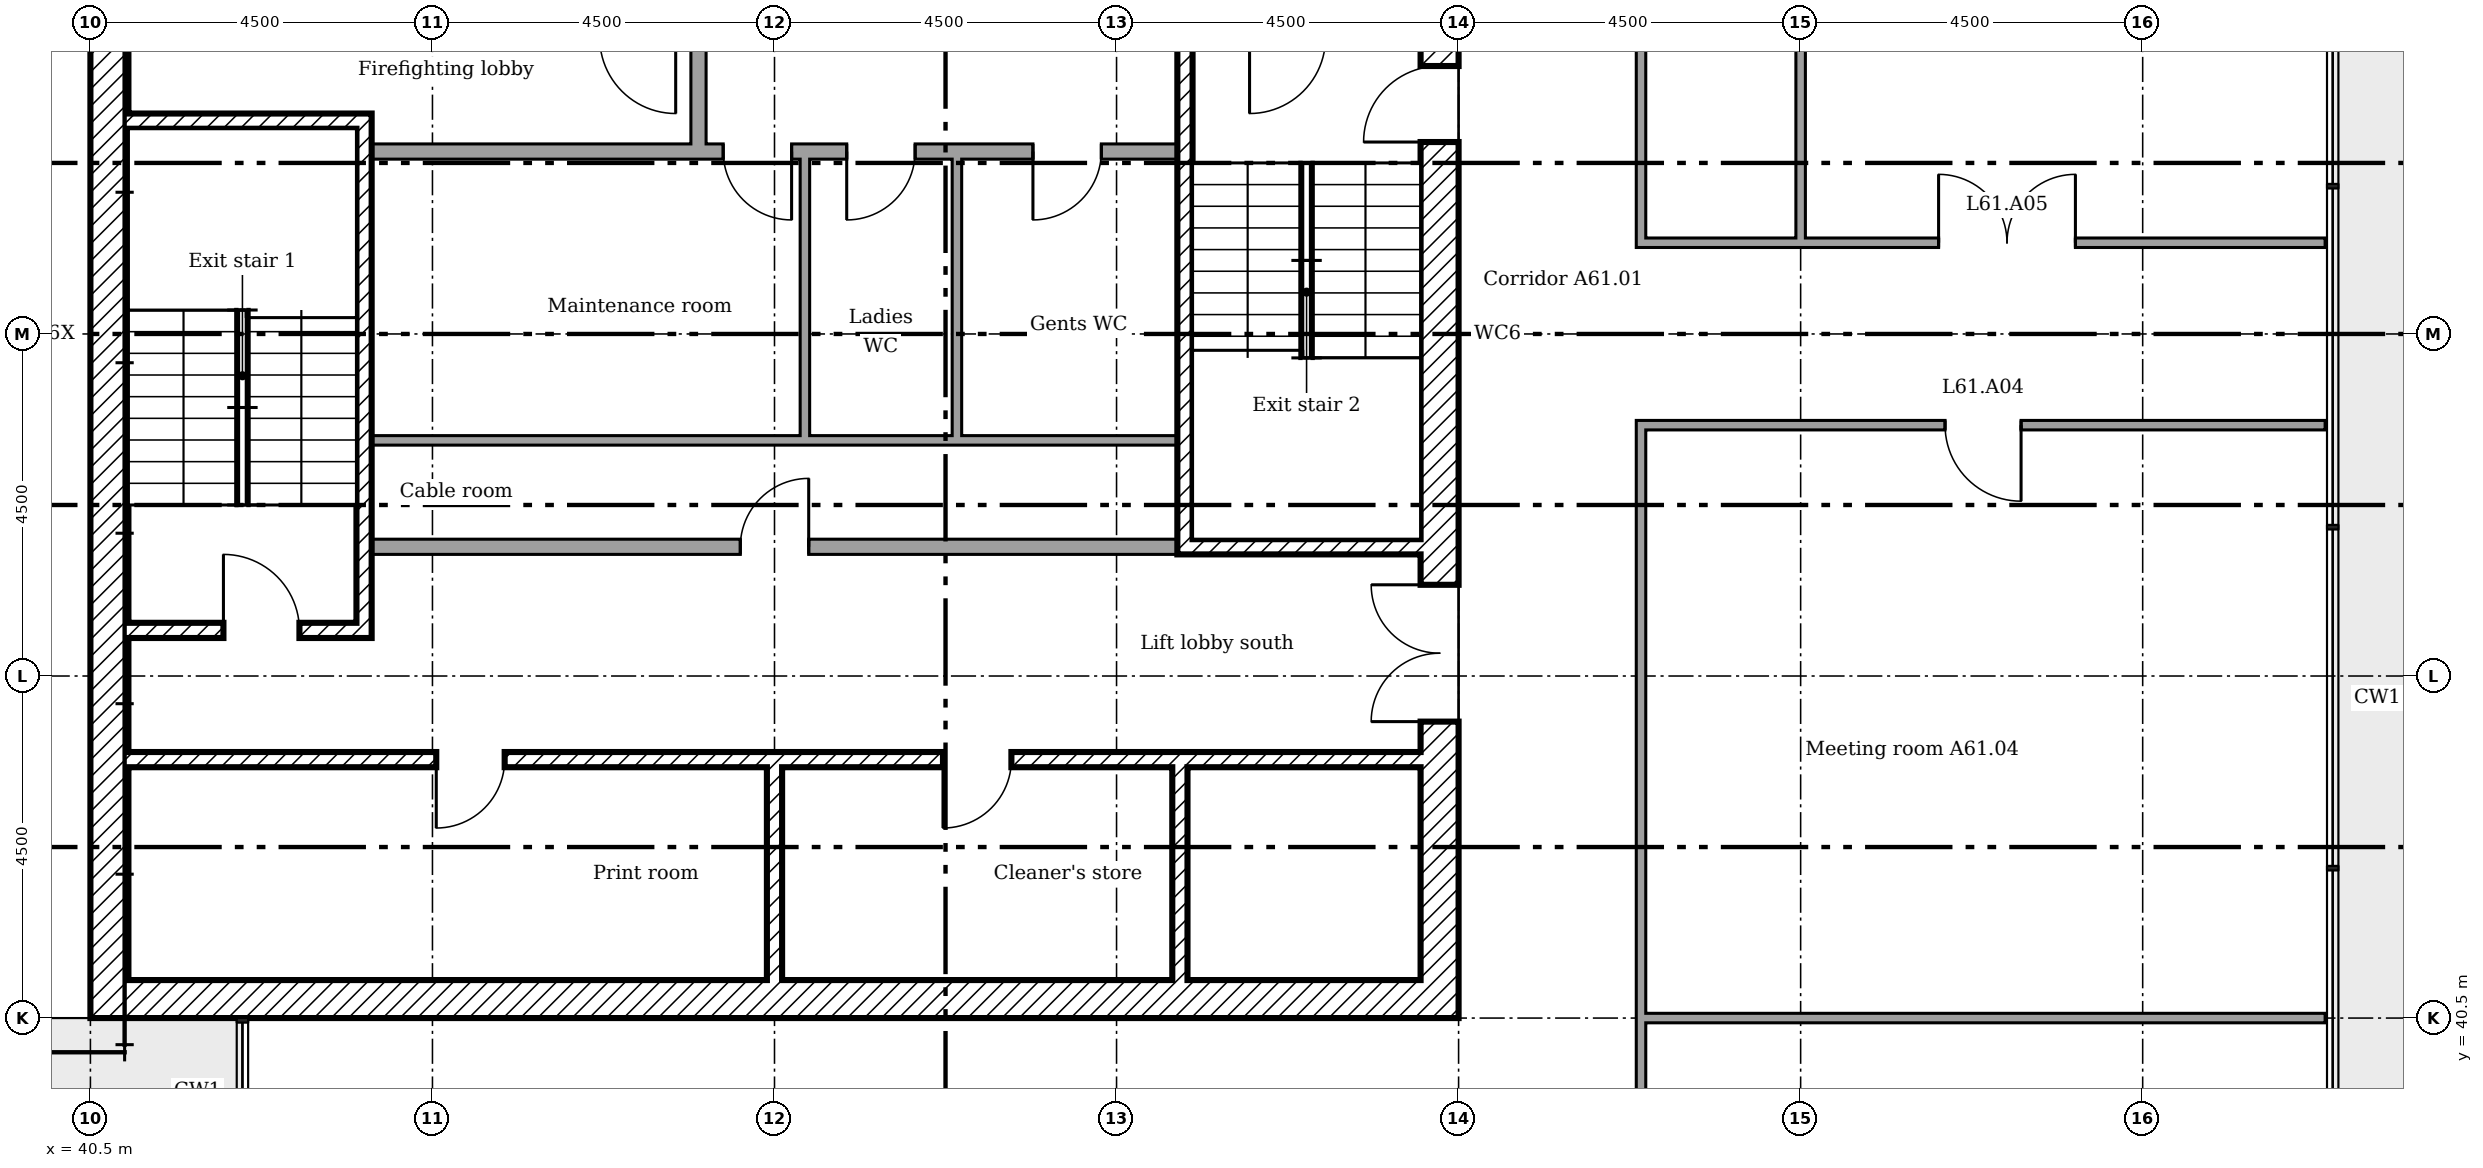
"""IFC4 building model, lengths in metres.
Left out: names, types, materials, properties, quantities, classifications, styles, units other than length and angle.
Written with IfcOpenShell. Run it as: python <this file> out.ifc"""

import sys

from ifc_helpers import new_model, si_unit, direction, frame, frame_2d, origin, place, context, subcontext, project, spatial, rectangle, extrude, element, fill, save


model = new_model("IFC4")
c1 = context("Model", 3, precision=1e-05, world=origin(), true_north=direction((0.0, 1.0)))
c2 = subcontext(c1, "Body", "Model", "MODEL_VIEW")
j1 = project(units=[si_unit("LENGTHUNIT", "METRE"), si_unit("PLANEANGLEUNIT", "RADIAN")], contexts=[c1])
p1 = place(None, origin())
s1 = spatial("IfcSite", under=j1, at=p1, CompositionType="ELEMENT")
p2 = place(p1, origin())
s2 = spatial("IfcBuilding", under=s1, at=p2, CompositionType="ELEMENT")
p3 = place(p2, frame((0.0, 0.0, 238.8)))
s3 = spatial("IfcBuildingStorey", under=s2, at=p3, CompositionType="ELEMENT", Elevation=238.8)
p4 = place(p3, frame((58.25, 40.5, 0.0), z_axis=(0.0, 0.0, 1.0), x_axis=(0.0, 1.0, 0.0)))
e1 = element("IfcWall", 1, at=p4, inside=s3, PredefinedType="SHEAR", context=c2, shape_type="SweptSolid", body=[
    extrude(rectangle(XDim=18.0, YDim=0.5, at=frame_2d((9.0, 0.0))), origin(), (0.0, 0.0, 1.0), 3.35),
])
p5 = place(p4, frame((13.15, 0.0, 0.0)))
e2 = element("IfcOpeningElement", 2, at=p5, cuts=e1, PredefinedType="OPENING", context=c2, shape_type="SweptSolid", body=[
    extrude(rectangle(XDim=1.2, YDim=2.1, at=frame_2d((0.6, 1.05))), frame((0.0, 0.26, 0.0), z_axis=(0.0, -1.0, 0.0), x_axis=(1.0, 0.0, 0.0)), (0.0, 0.0, 1.0), 0.52),
])
p6 = place(p4, frame((3.9, 0.0, 0.0)))
e3 = element("IfcOpeningElement", 3, at=p6, cuts=e1, PredefinedType="OPENING", context=c2, shape_type="SweptSolid", body=[
    extrude(rectangle(XDim=1.8, YDim=2.1, at=frame_2d((0.9, 1.05))), frame((0.0, 0.26, 0.0), z_axis=(0.0, -1.0, 0.0), x_axis=(1.0, 0.0, 0.0)), (0.0, 0.0, 1.0), 0.52),
])
p7 = place(p4, frame((11.525, 0.0, 0.0)))
e4 = element("IfcOpeningElement", 4, at=p7, cuts=e1, PredefinedType="OPENING", context=c2, shape_type="SweptSolid", body=[
    extrude(rectangle(XDim=1.0, YDim=2.1, at=frame_2d((0.5, 1.05))), frame((0.0, 0.26, 0.0), z_axis=(0.0, -1.0, 0.0), x_axis=(1.0, 0.0, 0.0)), (0.0, 0.0, 1.0), 0.52),
])
p8 = place(p3, frame((40.5, 40.75, 0.0)))
e5 = element("IfcWall", 5, at=p8, inside=s3, PredefinedType="SHEAR", context=c2, shape_type="SweptSolid", body=[
    extrude(rectangle(XDim=17.5, YDim=0.5, at=frame_2d((8.75, 0.0))), origin(), (0.0, 0.0, 1.0), 3.35),
])
p9 = place(p3, frame((40.75, 41.0, 0.0), z_axis=(0.0, 0.0, 1.0), x_axis=(0.0, 1.0, 0.0)))
e6 = element("IfcWall", 6, at=p9, inside=s3, PredefinedType="SHEAR", context=c2, shape_type="SweptSolid", body=[
    extrude(rectangle(XDim=17.0, YDim=0.5, at=frame_2d((8.5, 0.0))), origin(), (0.0, 0.0, 1.0), 3.35),
])
for number, where, z_axis, x_axis in (
    (7, (49.5, 41.0, 0.0), (0.0, 0.0, 1.0), (0.0, 1.0, 0.0)),
    (8, (54.833, 41.0, 0.0), (0.0, 0.0, 1.0), (0.0, 1.0, 0.0)),
):
    element("IfcWall", number, at=place(p3, frame(where, z_axis=z_axis, x_axis=x_axis)), inside=s3, PredefinedType="SHEAR", context=c2, shape_type="SweptSolid", body=[
        extrude(rectangle(XDim=2.8, YDim=0.2, at=frame_2d((1.4, 0.0))), origin(), (0.0, 0.0, 1.0), 3.35),
    ])
p10 = place(p3, frame((48.5, 51.9, 0.0), z_axis=(0.0, 0.0, 1.0), x_axis=(0.0, 1.0, 0.0)))
e9 = element("IfcWall", 9, at=p10, inside=s3, PredefinedType="PARTITIONING", context=c2, shape_type="SweptSolid", body=[
    extrude(rectangle(XDim=1.6, YDim=0.2, at=frame_2d((0.8, 0.0))), origin(), (0.0, 0.0, 1.0), 3.35),
])
p11 = place(p3, frame((41.0, 43.9, 0.0)))
e10 = element("IfcWall", 10, at=p11, inside=s3, PredefinedType="SHEAR", context=c2, shape_type="SweptSolid", body=[
    extrude(rectangle(XDim=17.0, YDim=0.2, at=frame_2d((8.5, 0.0))), origin(), (0.0, 0.0, 1.0), 3.35),
])
p12 = place(p11, frame((4.05, 0.0, 0.0)))
e11 = element("IfcOpeningElement", 11, at=p12, cuts=e10, PredefinedType="OPENING", context=c2, shape_type="SweptSolid", body=[
    extrude(rectangle(XDim=0.9, YDim=2.1, at=frame_2d((0.45, 1.05))), frame((0.0, 0.11, 0.0), z_axis=(0.0, -1.0, 0.0), x_axis=(1.0, 0.0, 0.0)), (0.0, 0.0, 1.0), 0.22),
])
p13 = place(p11, frame((10.717, 0.0, 0.0)))
e12 = element("IfcOpeningElement", 12, at=p13, cuts=e10, PredefinedType="OPENING", context=c2, shape_type="SweptSolid", body=[
    extrude(rectangle(XDim=0.9, YDim=2.1, at=frame_2d((0.45, 1.05))), frame((0.0, 0.11, 0.0), z_axis=(0.0, -1.0, 0.0), x_axis=(1.0, 0.0, 0.0)), (0.0, 0.0, 1.0), 0.22),
])
p14 = place(p3, frame((44.1, 45.5, 0.0), z_axis=(0.0, 0.0, 1.0), x_axis=(0.0, 1.0, 0.0)))
e13 = element("IfcWall", 13, at=p14, inside=s3, PredefinedType="SHEAR", context=c2, shape_type="SweptSolid", body=[
    extrude(rectangle(XDim=6.9, YDim=0.2, at=frame_2d((3.45, 0.0))), origin(), (0.0, 0.0, 1.0), 3.35),
])
p15 = place(p3, frame((41.0, 52.3, 0.0)))
e14 = element("IfcWall", 14, at=p15, inside=s3, PredefinedType="SHEAR", context=c2, shape_type="SweptSolid", body=[
    extrude(rectangle(XDim=3.0, YDim=0.2, at=frame_2d((1.5, 0.0))), origin(), (0.0, 0.0, 1.0), 3.35),
])
p16 = place(p3, frame((41.0, 45.6, 0.0)))
e15 = element("IfcWall", 15, at=p16, inside=s3, PredefinedType="SHEAR", context=c2, shape_type="SweptSolid", body=[
    extrude(rectangle(XDim=3.0, YDim=0.2, at=frame_2d((1.5, 0.0))), origin(), (0.0, 0.0, 1.0), 3.35),
])
p17 = place(p16, frame((1.25, 0.0, 0.0)))
e16 = element("IfcOpeningElement", 16, at=p17, cuts=e15, PredefinedType="OPENING", context=c2, shape_type="SweptSolid", body=[
    extrude(rectangle(XDim=1.0, YDim=2.1, at=frame_2d((0.5, 1.05))), frame((0.0, 0.11, 0.0), z_axis=(0.0, -1.0, 0.0), x_axis=(1.0, 0.0, 0.0)), (0.0, 0.0, 1.0), 0.22),
])
p18 = place(p3, frame((54.8, 46.7, 0.0)))
e17 = element("IfcWall", 17, at=p18, inside=s3, PredefinedType="SHEAR", context=c2, shape_type="SweptSolid", body=[
    extrude(rectangle(XDim=3.2, YDim=0.2, at=frame_2d((1.6, 0.0))), origin(), (0.0, 0.0, 1.0), 3.35),
])
p19 = place(p3, frame((54.9, 46.8, 0.0), z_axis=(0.0, 0.0, 1.0), x_axis=(0.0, 1.0, 0.0)))
e18 = element("IfcWall", 18, at=p19, inside=s3, PredefinedType="SHEAR", context=c2, shape_type="SweptSolid", body=[
    extrude(rectangle(XDim=6.5, YDim=0.2, at=frame_2d((3.25, 0.0))), origin(), (0.0, 0.0, 1.0), 3.35),
])
p20 = place(p3, frame((44.2, 51.9, 0.0)))
e19 = element("IfcWall", 19, at=p20, inside=s3, PredefinedType="PARTITIONING", context=c2, shape_type="SweptSolid", body=[
    extrude(rectangle(XDim=10.6, YDim=0.2, at=frame_2d((5.3, 0.0))), origin(), (0.0, 0.0, 1.0), 3.35),
])
p21 = place(p20, frame((4.625, 0.0, 0.0)))
e20 = element("IfcOpeningElement", 20, at=p21, cuts=e19, PredefinedType="OPENING", context=c2, shape_type="SweptSolid", body=[
    extrude(rectangle(XDim=0.9, YDim=2.1, at=frame_2d((0.45, 1.05))), frame((0.0, 0.11, 0.0), z_axis=(0.0, -1.0, 0.0), x_axis=(1.0, 0.0, 0.0)), (0.0, 0.0, 1.0), 0.22),
])
p22 = place(p20, frame((6.25, 0.0, 0.0)))
e21 = element("IfcOpeningElement", 21, at=p22, cuts=e19, PredefinedType="OPENING", context=c2, shape_type="SweptSolid", body=[
    extrude(rectangle(XDim=0.9, YDim=2.1, at=frame_2d((0.45, 1.05))), frame((0.0, 0.11, 0.0), z_axis=(0.0, -1.0, 0.0), x_axis=(1.0, 0.0, 0.0)), (0.0, 0.0, 1.0), 0.22),
])
p23 = place(p20, frame((8.7, 0.0, 0.0)))
e22 = element("IfcOpeningElement", 22, at=p23, cuts=e19, PredefinedType="OPENING", context=c2, shape_type="SweptSolid", body=[
    extrude(rectangle(XDim=0.9, YDim=2.1, at=frame_2d((0.45, 1.05))), frame((0.0, 0.11, 0.0), z_axis=(0.0, -1.0, 0.0), x_axis=(1.0, 0.0, 0.0)), (0.0, 0.0, 1.0), 0.22),
])
p24 = place(p3, frame((44.2, 46.7, 0.0)))
e23 = element("IfcWall", 23, at=p24, inside=s3, PredefinedType="PARTITIONING", context=c2, shape_type="SweptSolid", body=[
    extrude(rectangle(XDim=10.6, YDim=0.2, at=frame_2d((5.3, 0.0))), origin(), (0.0, 0.0, 1.0), 3.35),
])
p25 = place(p24, frame((4.85, 0.0, 0.0)))
e24 = element("IfcOpeningElement", 24, at=p25, cuts=e23, PredefinedType="OPENING", context=c2, shape_type="SweptSolid", body=[
    extrude(rectangle(XDim=0.9, YDim=2.1, at=frame_2d((0.45, 1.05))), frame((0.0, 0.11, 0.0), z_axis=(0.0, -1.0, 0.0), x_axis=(1.0, 0.0, 0.0)), (0.0, 0.0, 1.0), 0.22),
])
p26 = place(p3, frame((49.962, 48.1, 0.0), z_axis=(0.0, 0.0, 1.0), x_axis=(-1.0, 0.0, 0.0)))
e25 = element("IfcWall", 25, at=p26, inside=s3, PredefinedType="PARTITIONING", context=c2, shape_type="SweptSolid", body=[
    extrude(rectangle(XDim=5.762, YDim=0.125, at=frame_2d((2.881, 0.0))), origin(), (0.0, 0.0, 1.0), 3.35),
])
p27 = place(p3, frame((51.962, 48.1, 0.0), z_axis=(0.0, 0.0, 1.0), x_axis=(-1.0, 0.0, 0.0)))
e26 = element("IfcWall", 26, at=p27, inside=s3, PredefinedType="PARTITIONING", context=c2, shape_type="SweptSolid", body=[
    extrude(rectangle(XDim=2.062, YDim=0.125, at=frame_2d((1.031, 0.0))), origin(), (0.0, 0.0, 1.0), 3.35),
])
p28 = place(p3, frame((49.9, 48.163, 0.0), z_axis=(0.0, 0.0, 1.0), x_axis=(0.0, 1.0, 0.0)))
e27 = element("IfcWall", 27, at=p28, inside=s3, PredefinedType="PARTITIONING", context=c2, shape_type="SweptSolid", body=[
    extrude(rectangle(XDim=3.637, YDim=0.125, at=frame_2d((1.819, 0.0))), origin(), (0.0, 0.0, 1.0), 3.35),
])
p29 = place(p3, frame((54.8, 48.1, 0.0), z_axis=(0.0, 0.0, 1.0), x_axis=(-1.0, 0.0, 0.0)))
e28 = element("IfcWall", 28, at=p29, inside=s3, PredefinedType="PARTITIONING", context=c2, shape_type="SweptSolid", body=[
    extrude(rectangle(XDim=2.9, YDim=0.125, at=frame_2d((1.45, 0.0))), origin(), (0.0, 0.0, 1.0), 3.35),
])
p30 = place(p3, frame((51.9, 48.163, 0.0), z_axis=(0.0, 0.0, 1.0), x_axis=(0.0, 1.0, 0.0)))
e29 = element("IfcWall", 29, at=p30, inside=s3, PredefinedType="PARTITIONING", context=c2, shape_type="SweptSolid", body=[
    extrude(rectangle(XDim=3.637, YDim=0.125, at=frame_2d((1.819, 0.0))), origin(), (0.0, 0.0, 1.0), 3.35),
])
p31 = place(p3, frame((60.9, 40.5, 0.0)))
e30 = element("IfcWall", 30, at=p31, inside=s3, PredefinedType="PARTITIONING", context=c2, shape_type="SweptSolid", body=[
    extrude(rectangle(XDim=9.0, YDim=0.125, at=frame_2d((4.5, 0.0))), origin(), (0.0, 0.0, 1.0), 2.772),
])
p32 = place(p3, frame((60.837, 48.3, 0.0)))
e31 = element("IfcWall", 31, at=p32, inside=s3, PredefinedType="PARTITIONING", context=c2, shape_type="SweptSolid", body=[
    extrude(rectangle(XDim=9.062, YDim=0.125, at=frame_2d((4.531, 0.0))), origin(), (0.0, 0.0, 1.0), 3.45),
])
p33 = place(p32, frame((4.062, 0.0, 0.0)))
e32 = element("IfcOpeningElement", 32, at=p33, cuts=e31, PredefinedType="OPENING", context=c2, shape_type="SweptSolid", body=[
    extrude(rectangle(XDim=1.0, YDim=2.1, at=frame_2d((0.5, 1.05))), frame((0.0, 0.073, 0.0), z_axis=(0.0, -1.0, 0.0), x_axis=(1.0, 0.0, 0.0)), (0.0, 0.0, 1.0), 0.145),
])
p34 = place(p3, frame((60.837, 50.7, 0.0)))
e33 = element("IfcWall", 33, at=p34, inside=s3, PredefinedType="PARTITIONING", context=c2, shape_type="SweptSolid", body=[
    extrude(rectangle(XDim=9.062, YDim=0.125, at=frame_2d((4.531, 0.0))), origin(), (0.0, 0.0, 1.0), 3.45),
])
p35 = place(p34, frame((3.978, 0.0, 0.0)))
e34 = element("IfcOpeningElement", 34, at=p35, cuts=e33, PredefinedType="OPENING", context=c2, shape_type="SweptSolid", body=[
    extrude(rectangle(XDim=1.8, YDim=2.1, at=frame_2d((0.9, 1.05))), frame((0.0, 0.073, 0.0), z_axis=(0.0, -1.0, 0.0), x_axis=(1.0, 0.0, 0.0)), (0.0, 0.0, 1.0), 0.145),
])
p36 = place(p3, frame((60.9, 38.762, 0.0), z_axis=(0.0, 0.0, 1.0), x_axis=(0.0, 1.0, 0.0)))
e35 = element("IfcWall", 35, at=p36, inside=s3, PredefinedType="PARTITIONING", context=c2, shape_type="SweptSolid", body=[
    extrude(rectangle(XDim=9.475, YDim=0.125, at=frame_2d((4.738, 0.0))), origin(), (0.0, 0.0, 1.0), 3.45),
])
p37 = place(p3, frame((60.9, 50.762, 0.0), z_axis=(0.0, 0.0, 1.0), x_axis=(0.0, 1.0, 0.0)))
e36 = element("IfcWall", 36, at=p37, inside=s3, PredefinedType="PARTITIONING", context=c2, shape_type="SweptSolid", body=[
    extrude(rectangle(XDim=9.775, YDim=0.125, at=frame_2d((4.888, 0.0))), origin(), (0.0, 0.0, 1.0), 3.45),
])
p38 = place(p37, frame((5.788, 0.0, 0.0)))
e37 = element("IfcOpeningElement", 37, at=p38, cuts=e36, PredefinedType="OPENING", context=c2, shape_type="SweptSolid", body=[
    extrude(rectangle(XDim=1.0, YDim=2.1, at=frame_2d((0.5, 1.05))), frame((0.0, 0.073, 0.0), z_axis=(0.0, -1.0, 0.0), x_axis=(1.0, 0.0, 0.0)), (0.0, 0.0, 1.0), 0.145),
])
p39 = place(p3, frame((63.0, 50.7, 0.0), z_axis=(0.0, 0.0, 1.0), x_axis=(0.0, 1.0, 0.0)))
e38 = element("IfcWall", 38, at=p39, inside=s3, PredefinedType="PARTITIONING", context=c2, shape_type="SweptSolid", body=[
    extrude(rectangle(XDim=7.5, YDim=0.125, at=frame_2d((3.75, 0.0))), origin(), (0.0, 0.0, 1.0), 3.45),
])
p40 = place(p6, origin())
e39 = element("IfcDoor", 39, at=p40, inside=s3, OperationType="DOUBLE_DOOR_SINGLE_SWING", PredefinedType="DOOR", context=c2, shape_type="SweptSolid", body=[
    extrude(rectangle(XDim=1.8, YDim=2.1, at=frame_2d((0.9, 1.05))), frame((0.0, 0.025, 0.0), z_axis=(0.0, -1.0, 0.0), x_axis=(1.0, 0.0, 0.0)), (0.0, 0.0, 1.0), 0.05),
])
fill(e3, e39)
p41 = place(p17, origin())
e40 = element("IfcDoor", 40, at=p41, inside=s3, OperationType="SINGLE_SWING_RIGHT", PredefinedType="DOOR", context=c2, shape_type="SweptSolid", body=[
    extrude(rectangle(XDim=1.0, YDim=2.1, at=frame_2d((0.5, 1.05))), frame((0.0, 0.025, 0.0), z_axis=(0.0, -1.0, 0.0), x_axis=(1.0, 0.0, 0.0)), (0.0, 0.0, 1.0), 0.05),
])
fill(e16, e40)
p42 = place(p7, origin())
e41 = element("IfcDoor", 41, at=p42, inside=s3, OperationType="SINGLE_SWING_RIGHT", PredefinedType="DOOR", context=c2, shape_type="SweptSolid", body=[
    extrude(rectangle(XDim=1.0, YDim=2.1, at=frame_2d((0.5, 1.05))), frame((0.0, 0.025, 0.0), z_axis=(0.0, -1.0, 0.0), x_axis=(1.0, 0.0, 0.0)), (0.0, 0.0, 1.0), 0.05),
])
fill(e4, e41)
p43 = place(p12, frame((0.9, 0.0, 0.0), x_axis=(-1.0, 0.0, 0.0)))
e42 = element("IfcDoor", 42, at=p43, inside=s3, OperationType="SINGLE_SWING_LEFT", PredefinedType="DOOR", context=c2, shape_type="SweptSolid", body=[
    extrude(rectangle(XDim=0.9, YDim=2.1, at=frame_2d((0.45, 1.05))), frame((0.0, 0.025, 0.0), z_axis=(0.0, -1.0, 0.0), x_axis=(1.0, 0.0, 0.0)), (0.0, 0.0, 1.0), 0.05),
])
fill(e11, e42)
p44 = place(p13, frame((0.9, 0.0, 0.0), x_axis=(-1.0, 0.0, 0.0)))
e43 = element("IfcDoor", 43, at=p44, inside=s3, OperationType="SINGLE_SWING_LEFT", PredefinedType="DOOR", context=c2, shape_type="SweptSolid", body=[
    extrude(rectangle(XDim=0.9, YDim=2.1, at=frame_2d((0.45, 1.05))), frame((0.0, 0.025, 0.0), z_axis=(0.0, -1.0, 0.0), x_axis=(1.0, 0.0, 0.0)), (0.0, 0.0, 1.0), 0.05),
])
fill(e12, e43)
p45 = place(p25, origin())
e44 = element("IfcDoor", 44, at=p45, inside=s3, OperationType="SINGLE_SWING_LEFT", PredefinedType="DOOR", context=c2, shape_type="SweptSolid", body=[
    extrude(rectangle(XDim=0.9, YDim=2.1, at=frame_2d((0.45, 1.05))), frame((0.0, 0.025, 0.0), z_axis=(0.0, -1.0, 0.0), x_axis=(1.0, 0.0, 0.0)), (0.0, 0.0, 1.0), 0.05),
])
fill(e24, e44)
p46 = place(p21, frame((0.9, 0.0, 0.0), x_axis=(-1.0, 0.0, 0.0)))
e45 = element("IfcDoor", 45, at=p46, inside=s3, OperationType="SINGLE_SWING_RIGHT", PredefinedType="DOOR", context=c2, shape_type="SweptSolid", body=[
    extrude(rectangle(XDim=0.9, YDim=2.1, at=frame_2d((0.45, 1.05))), frame((0.0, 0.025, 0.0), z_axis=(0.0, -1.0, 0.0), x_axis=(1.0, 0.0, 0.0)), (0.0, 0.0, 1.0), 0.05),
])
fill(e20, e45)
p47 = place(p22, frame((0.9, 0.0, 0.0), x_axis=(-1.0, 0.0, 0.0)))
e46 = element("IfcDoor", 46, at=p47, inside=s3, OperationType="SINGLE_SWING_LEFT", PredefinedType="DOOR", context=c2, shape_type="SweptSolid", body=[
    extrude(rectangle(XDim=0.9, YDim=2.1, at=frame_2d((0.45, 1.05))), frame((0.0, 0.025, 0.0), z_axis=(0.0, -1.0, 0.0), x_axis=(1.0, 0.0, 0.0)), (0.0, 0.0, 1.0), 0.05),
])
fill(e21, e46)
p48 = place(p23, frame((0.9, 0.0, 0.0), x_axis=(-1.0, 0.0, 0.0)))
e47 = element("IfcDoor", 47, at=p48, inside=s3, OperationType="SINGLE_SWING_LEFT", PredefinedType="DOOR", context=c2, shape_type="SweptSolid", body=[
    extrude(rectangle(XDim=0.9, YDim=2.1, at=frame_2d((0.45, 1.05))), frame((0.0, 0.025, 0.0), z_axis=(0.0, -1.0, 0.0), x_axis=(1.0, 0.0, 0.0)), (0.0, 0.0, 1.0), 0.05),
])
fill(e22, e47)
p49 = place(p33, frame((1.0, 0.0, 0.0), x_axis=(-1.0, 0.0, 0.0)))
e48 = element("IfcDoor", 48, at=p49, inside=s3, OperationType="SINGLE_SWING_RIGHT", PredefinedType="DOOR", context=c2, shape_type="SweptSolid", body=[
    extrude(rectangle(XDim=1.0, YDim=2.1, at=frame_2d((0.5, 1.05))), frame((0.0, 0.025, 0.0), z_axis=(0.0, -1.0, 0.0), x_axis=(1.0, 0.0, 0.0)), (0.0, 0.0, 1.0), 0.05),
])
fill(e32, e48)
p50 = place(p35, origin())
e49 = element("IfcDoor", 49, at=p50, inside=s3, OperationType="DOUBLE_DOOR_SINGLE_SWING", PredefinedType="DOOR", context=c2, shape_type="SweptSolid", body=[
    extrude(rectangle(XDim=1.8, YDim=2.1, at=frame_2d((0.9, 1.05))), frame((0.0, 0.025, 0.0), z_axis=(0.0, -1.0, 0.0), x_axis=(1.0, 0.0, 0.0)), (0.0, 0.0, 1.0), 0.05),
])
fill(e34, e49)
save(model, sys.argv[1])
